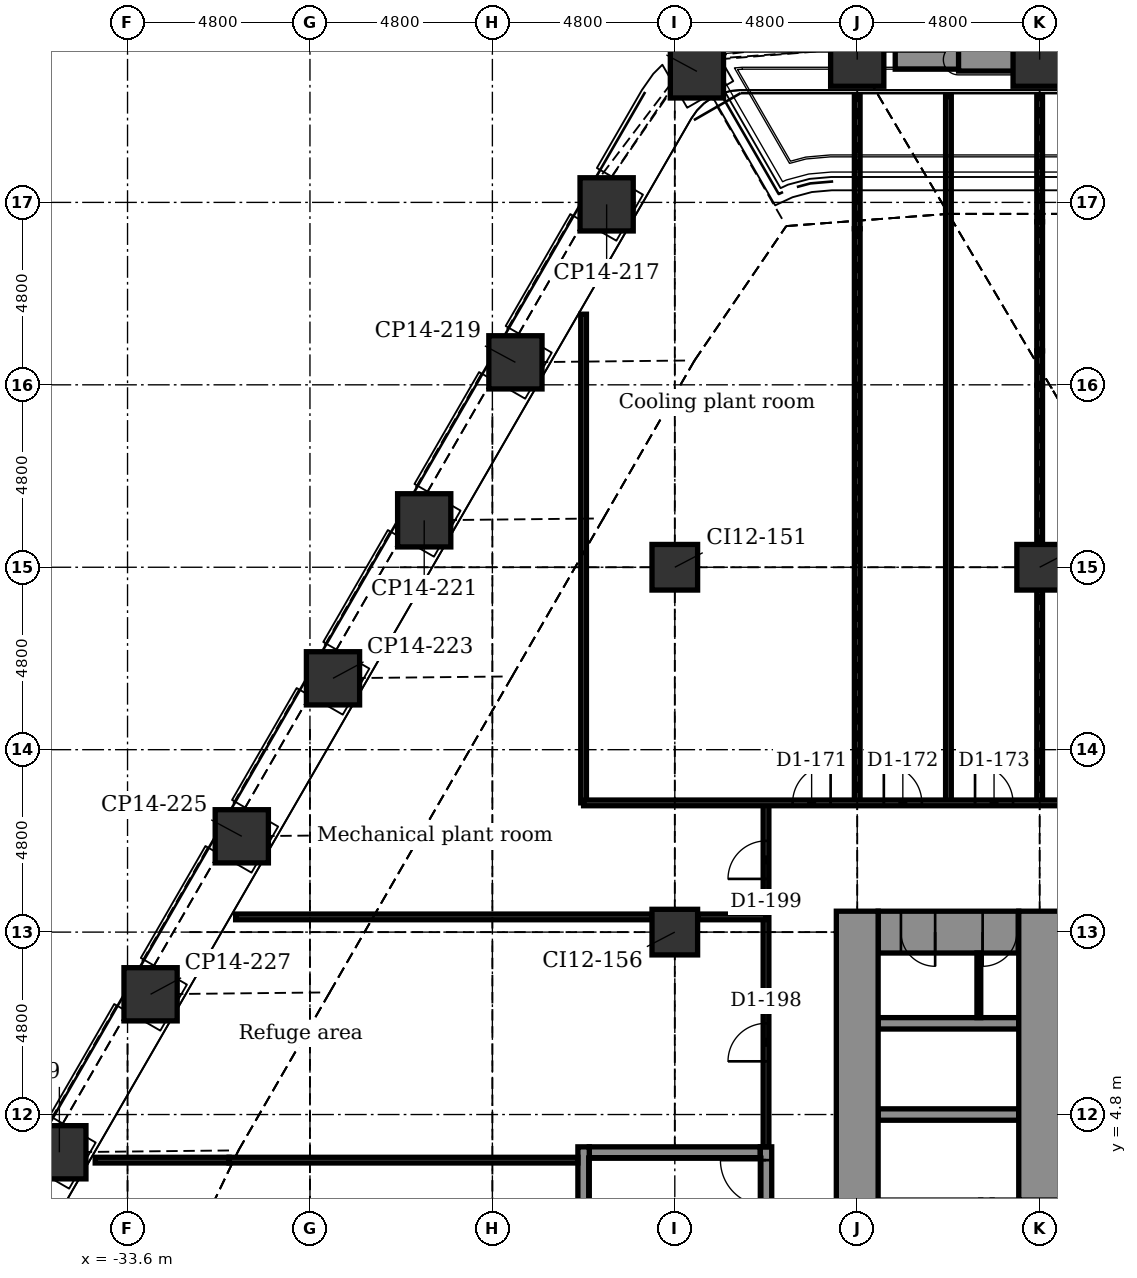
"""IFC4 building model, lengths in metres.
Left out: names, types, materials, properties, quantities, classifications, styles, units other than length and angle.
Written with IfcOpenShell. Run it as: python <this file> out.ifc"""

import sys

from ifc_helpers import new_model, si_unit, direction, frame, frame_2d, origin, origin_2d, place, context, subcontext, project, spatial, rectangle, extrude, element, fill, save


model = new_model("IFC4")
c1 = context("Model", 3, precision=1e-05, world=origin(), true_north=direction((0.0, 1.0)))
c2 = subcontext(c1, "Body", "Model", "MODEL_VIEW")
j1 = project(units=[si_unit("LENGTHUNIT", "METRE"), si_unit("PLANEANGLEUNIT", "RADIAN")], contexts=[c1])
p1 = place(None, origin())
s1 = spatial("IfcSite", under=j1, at=p1, CompositionType="ELEMENT")
p2 = place(p1, origin())
s2 = spatial("IfcBuilding", under=s1, at=p2, CompositionType="ELEMENT")
p3 = place(p2, frame((0.0, 0.0, 71.9)))
s3 = spatial("IfcBuildingStorey", under=s2, at=p3, CompositionType="ELEMENT", Elevation=71.9)
for number, where, z_axis, x_axis in (
    (1, (-18.618, 32.247, -0.3), (0.0, 0.0, 1.0), (0.866, 0.5, 0.0)),
    (2, (-14.4, 32.555, -0.3), (0.0, 0.0, 1.0), (1.0, 0.0, 0.0)),
    (3, (-9.6, 32.555, -0.3), (0.0, 0.0, 1.0), (1.0, 0.0, 0.0)),
    (4, (-35.394, 3.807, -0.3), (0.0, 0.0, 1.0), (0.5, 0.866, 0.0)),
    (5, (-32.994, 7.964, -0.3), (0.0, 0.0, 1.0), (0.5, 0.866, 0.0)),
    (6, (-30.594, 12.121, -0.3), (0.0, 0.0, 1.0), (0.5, 0.866, 0.0)),
    (7, (-28.194, 16.278, -0.3), (0.0, 0.0, 1.0), (0.5, 0.866, 0.0)),
    (8, (-25.794, 20.435, -0.3), (0.0, 0.0, 1.0), (0.5, 0.866, 0.0)),
    (9, (-23.394, 24.592, -0.3), (0.0, 0.0, 1.0), (0.5, 0.866, 0.0)),
    (10, (-20.994, 28.749, -0.3), (0.0, 0.0, 1.0), (0.5, 0.866, 0.0)),
):
    element("IfcColumn", number, at=place(p3, frame(where, z_axis=z_axis, x_axis=x_axis)), inside=s3, PredefinedType="COLUMN", context=c2, shape_type="SweptSolid", body=[
        extrude(rectangle(XDim=1.4, YDim=1.4, at=origin_2d()), origin(), (0.0, 0.0, 1.0), 6.1),
    ])
for number, where, z_axis, x_axis in (
    (11, (-19.2, 9.6, -0.3), (0.0, 0.0, 1.0), (1.0, 0.0, 0.0)),
    (12, (-19.2, 19.2, -0.3), (0.0, 0.0, 1.0), (1.0, 0.0, 0.0)),
    (13, (-9.6, 19.2, -0.3), (0.0, 0.0, 1.0), (1.0, 0.0, 0.0)),
):
    element("IfcColumn", number, at=place(p3, frame(where, z_axis=z_axis, x_axis=x_axis)), inside=s3, PredefinedType="COLUMN", context=c2, shape_type="SweptSolid", body=[
        extrude(rectangle(XDim=1.2, YDim=1.2, at=origin_2d()), origin(), (0.0, 0.0, 1.0), 6.1),
    ])
p4 = place(p3, frame((-21.45, 3.8, -0.3), z_axis=(0.0, 0.0, 1.0), x_axis=(1.0, 0.0, 0.0)))
e14 = element("IfcWall", 14, at=p4, inside=s3, PredefinedType="STANDARD", context=c2, shape_type="SweptSolid", body=[
    extrude(rectangle(XDim=4.5, YDim=0.3, at=frame_2d((2.25, 0.0))), origin(), (0.0, 0.0, 1.0), 6.1),
])
for number, where, z_axis, x_axis in (
    (15, (-13.85, 4.8, -0.3), (0.0, 0.0, 1.0), (1.0, 0.0, 0.0)),
    (16, (-13.85, 7.2, -0.3), (0.0, 0.0, 1.0), (1.0, 0.0, 0.0)),
):
    element("IfcWall", number, at=place(p3, frame(where, z_axis=z_axis, x_axis=x_axis)), inside=s3, PredefinedType="STANDARD", context=c2, shape_type="SweptSolid", body=[
        extrude(rectangle(XDim=3.7, YDim=0.3, at=frame_2d((1.85, 0.0))), origin(), (0.0, 0.0, 1.0), 6.1),
    ])
p5 = place(p3, frame((-13.85, 9.6, -0.3), z_axis=(0.0, 0.0, 1.0), x_axis=(1.0, 0.0, 0.0)))
e17 = element("IfcWall", 17, at=p5, inside=s3, PredefinedType="SHEAR", context=c2, shape_type="SweptSolid", body=[
    extrude(rectangle(XDim=3.7, YDim=1.1, at=frame_2d((1.85, 0.0))), origin(), (0.0, 0.0, 1.0), 6.1),
])
p6 = place(p5, frame((0.6, 0.0, 0.3)))
e18 = element("IfcOpeningElement", 18, at=p6, cuts=e17, PredefinedType="OPENING", context=c2, shape_type="SweptSolid", body=[
    extrude(rectangle(XDim=0.9, YDim=2.1, at=frame_2d((0.45, 1.05))), frame((0.0, 0.56, 0.0), z_axis=(0.0, -1.0, 0.0), x_axis=(1.0, 0.0, 0.0)), (0.0, 0.0, 1.0), 1.12),
])
p7 = place(p5, frame((2.75, 0.0, 0.3)))
e19 = element("IfcOpeningElement", 19, at=p7, cuts=e17, PredefinedType="OPENING", context=c2, shape_type="SweptSolid", body=[
    extrude(rectangle(XDim=0.9, YDim=2.1, at=frame_2d((0.45, 1.05))), frame((0.0, 0.56, 0.0), z_axis=(0.0, -1.0, 0.0), x_axis=(1.0, 0.0, 0.0)), (0.0, 0.0, 1.0), 1.12),
])
p8 = place(p3, frame((-21.6, -3.95, -0.3), z_axis=(0.0, 0.0, 1.0), x_axis=(0.0, 1.0, 0.0)))
e20 = element("IfcWall", 20, at=p8, inside=s3, PredefinedType="STANDARD", context=c2, shape_type="SweptSolid", body=[
    extrude(rectangle(XDim=7.9, YDim=0.3, at=frame_2d((3.95, 0.0))), origin(), (0.0, 0.0, 1.0), 6.1),
])
p9 = place(p3, frame((-16.8, -3.95, -0.3), z_axis=(0.0, 0.0, 1.0), x_axis=(0.0, 1.0, 0.0)))
e21 = element("IfcWall", 21, at=p9, inside=s3, PredefinedType="STANDARD", context=c2, shape_type="SweptSolid", body=[
    extrude(rectangle(XDim=7.9, YDim=0.3, at=frame_2d((3.95, 0.0))), origin(), (0.0, 0.0, 1.0), 6.1),
])
p10 = place(p9, frame((6.35, 0.0, 0.3)))
e22 = element("IfcOpeningElement", 22, at=p10, cuts=e21, PredefinedType="OPENING", context=c2, shape_type="SweptSolid", body=[
    extrude(rectangle(XDim=1.2, YDim=2.1, at=frame_2d((0.6, 1.05))), frame((0.0, 0.16, 0.0), z_axis=(0.0, -1.0, 0.0), x_axis=(1.0, 0.0, 0.0)), (0.0, 0.0, 1.0), 0.32),
])
p11 = place(p3, frame((-14.4, -10.15, -0.3), z_axis=(0.0, 0.0, 1.0), x_axis=(0.0, 1.0, 0.0)))
e23 = element("IfcWall", 23, at=p11, inside=s3, PredefinedType="SHEAR", context=c2, shape_type="SweptSolid", body=[
    extrude(rectangle(XDim=20.3, YDim=1.1, at=frame_2d((10.15, 0.0))), origin(), (0.0, 0.0, 1.0), 6.1),
])
p12 = place(p11, frame((3.6, 0.0, 0.3)))
e24 = element("IfcOpeningElement", 24, at=p12, cuts=e23, PredefinedType="OPENING", context=c2, shape_type="SweptSolid", body=[
    extrude(rectangle(XDim=1.1, YDim=2.1, at=frame_2d((0.55, 1.05))), frame((0.0, 0.56, 0.0), z_axis=(0.0, -1.0, 0.0), x_axis=(1.0, 0.0, 0.0)), (0.0, 0.0, 1.0), 1.12),
])
p13 = place(p11, frame((6.0, 0.0, 0.3)))
e25 = element("IfcOpeningElement", 25, at=p13, cuts=e23, PredefinedType="OPENING", context=c2, shape_type="SweptSolid", body=[
    extrude(rectangle(XDim=1.1, YDim=2.1, at=frame_2d((0.55, 1.05))), frame((0.0, 0.56, 0.0), z_axis=(0.0, -1.0, 0.0), x_axis=(1.0, 0.0, 0.0)), (0.0, 0.0, 1.0), 1.12),
])
p14 = place(p11, frame((8.4, 0.0, 0.3)))
e26 = element("IfcOpeningElement", 26, at=p14, cuts=e23, PredefinedType="OPENING", context=c2, shape_type="SweptSolid", body=[
    extrude(rectangle(XDim=1.1, YDim=2.1, at=frame_2d((0.55, 1.05))), frame((0.0, 0.56, 0.0), z_axis=(0.0, -1.0, 0.0), x_axis=(1.0, 0.0, 0.0)), (0.0, 0.0, 1.0), 1.12),
])
p15 = place(p11, frame((10.8, 0.0, 0.3)))
e27 = element("IfcOpeningElement", 27, at=p15, cuts=e23, PredefinedType="OPENING", context=c2, shape_type="SweptSolid", body=[
    extrude(rectangle(XDim=1.1, YDim=2.1, at=frame_2d((0.55, 1.05))), frame((0.0, 0.56, 0.0), z_axis=(0.0, -1.0, 0.0), x_axis=(1.0, 0.0, 0.0)), (0.0, 0.0, 1.0), 1.12),
])
p16 = place(p3, frame((-9.6, 2.55, -0.3), z_axis=(0.0, 0.0, 1.0), x_axis=(0.0, 1.0, 0.0)))
e28 = element("IfcWall", 28, at=p16, inside=s3, PredefinedType="SHEAR", context=c2, shape_type="SweptSolid", body=[
    extrude(rectangle(XDim=7.6, YDim=1.1, at=frame_2d((3.8, 0.0))), origin(), (0.0, 0.0, 1.0), 6.1),
])
p17 = place(p3, frame((-13.4, 32.605, 0.0), z_axis=(0.0, 0.0, 1.0), x_axis=(1.0, 0.0, 0.0)))
e29 = element("IfcWall", 29, at=p17, inside=s3, PredefinedType="USERDEFINED", context=c2, shape_type="SweptSolid", body=[
    extrude(rectangle(XDim=2.8, YDim=0.6, at=frame_2d((1.4, 0.0))), origin(), (0.0, 0.0, 1.0), 0.7),
])
p18 = place(p3, frame((-11.734, 32.555, 6.0), z_axis=(0.0, 0.0, 1.0), x_axis=(1.0, 0.0, 0.0)))
e30 = element("IfcWall", 30, at=p18, inside=s3, PredefinedType="USERDEFINED", context=c2, shape_type="SweptSolid", body=[
    extrude(rectangle(XDim=6.0, YDim=0.6, at=frame_2d((3.0, 0.0))), origin(), (0.0, 0.0, 1.0), 0.7),
])
p19 = place(p3, frame((-9.6, 13.0, 0.0), z_axis=(0.0, 0.0, 1.0), x_axis=(0.0, 1.0, 0.0)))
e31 = element("IfcWall", 31, at=p19, inside=s3, PredefinedType="PARTITIONING", context=c2, shape_type="SweptSolid", body=[
    extrude(rectangle(XDim=5.6, YDim=0.15, at=frame_2d((2.8, 0.0))), origin(), (0.0, 0.0, 1.0), 5.343),
])
p20 = place(p3, frame((-9.6, 19.8, 0.0), z_axis=(0.0, 0.0, 1.0), x_axis=(0.0, 1.0, 0.0)))
e32 = element("IfcWall", 32, at=p20, inside=s3, PredefinedType="PARTITIONING", context=c2, shape_type="SweptSolid", body=[
    extrude(rectangle(XDim=4.19, YDim=0.15, at=frame_2d((2.095, 0.0))), origin(), (0.0, 0.0, 1.0), 5.49),
])
p21 = place(p3, frame((-9.6, 23.99, 0.0), z_axis=(0.0, 0.0, 1.0), x_axis=(0.0, 1.0, 0.0)))
e33 = element("IfcWall", 33, at=p21, inside=s3, PredefinedType="PARTITIONING", context=c2, shape_type="SweptSolid", body=[
    extrude(rectangle(XDim=0.902, YDim=0.15, at=frame_2d((0.451, 0.0))), origin(), (0.0, 0.0, 1.0), 5.7),
])
p22 = place(p3, frame((-9.6, 24.893, 0.0), z_axis=(0.0, 0.0, 1.0), x_axis=(0.0, 1.0, 0.0)))
e34 = element("IfcWall", 34, at=p22, inside=s3, PredefinedType="PARTITIONING", context=c2, shape_type="SweptSolid", body=[
    extrude(rectangle(XDim=3.396, YDim=0.15, at=frame_2d((1.698, 0.0))), origin(), (0.0, 0.0, 1.0), 5.49),
])
p23 = place(p3, frame((-9.6, 28.289, 0.0), z_axis=(0.0, 0.0, 1.0), x_axis=(0.0, 1.0, 0.0)))
e35 = element("IfcWall", 35, at=p23, inside=s3, PredefinedType="PARTITIONING", context=c2, shape_type="SweptSolid", body=[
    extrude(rectangle(XDim=3.297, YDim=0.15, at=frame_2d((1.648, 0.0))), origin(), (0.0, 0.0, 1.0), 5.7),
])
p24 = place(p3, frame((-11.2, 7.35, 0.0), z_axis=(0.0, 0.0, 1.0), x_axis=(0.0, 1.0, 0.0)))
e36 = element("IfcWall", 36, at=p24, inside=s3, PredefinedType="PARTITIONING", context=c2, shape_type="SweptSolid", body=[
    extrude(rectangle(XDim=1.7, YDim=0.1, at=frame_2d((0.85, 0.0))), origin(), (0.0, 0.0, 1.0), 5.8),
])
p25 = place(p3, frame((-12.0, 13.0, 0.0), z_axis=(0.0, 0.0, 1.0), x_axis=(0.0, 1.0, 0.0)))
e37 = element("IfcWall", 37, at=p25, inside=s3, PredefinedType="PARTITIONING", context=c2, shape_type="SweptSolid", body=[
    extrude(rectangle(XDim=18.585, YDim=0.15, at=frame_2d((9.293, 0.0))), origin(), (0.0, 0.0, 1.0), 5.7),
])
p26 = place(p3, frame((-14.4, 13.0, 0.0), z_axis=(0.0, 0.0, 1.0), x_axis=(0.0, 1.0, 0.0)))
e38 = element("IfcWall", 38, at=p26, inside=s3, PredefinedType="PARTITIONING", context=c2, shape_type="SweptSolid", body=[
    extrude(rectangle(XDim=15.107, YDim=0.15, at=frame_2d((7.553, 0.0))), origin(), (0.0, 0.0, 1.0), 5.343),
])
p27 = place(p3, frame((-14.4, 28.107, 0.0), z_axis=(0.0, 0.0, 1.0), x_axis=(0.0, 1.0, 0.0)))
e39 = element("IfcWall", 39, at=p27, inside=s3, PredefinedType="PARTITIONING", context=c2, shape_type="SweptSolid", body=[
    extrude(rectangle(XDim=3.479, YDim=0.15, at=frame_2d((1.739, 0.0))), origin(), (0.0, 0.0, 1.0), 5.7),
])
p28 = place(p3, frame((-16.8, 3.95, 0.0), z_axis=(0.0, 0.0, 1.0), x_axis=(0.0, 1.0, 0.0)))
e40 = element("IfcWall", 40, at=p28, inside=s3, PredefinedType="PARTITIONING", context=c2, shape_type="SweptSolid", body=[
    extrude(rectangle(XDim=9.05, YDim=0.15, at=frame_2d((4.525, 0.0))), origin(), (0.0, 0.0, 1.0), 5.8),
])
p29 = place(p28, frame((2.25, 0.0, 0.0)))
e41 = element("IfcOpeningElement", 41, at=p29, cuts=e40, PredefinedType="OPENING", context=c2, shape_type="SweptSolid", body=[
    extrude(rectangle(XDim=1.0, YDim=2.1, at=frame_2d((0.5, 1.05))), frame((0.0, 0.085, 0.0), z_axis=(0.0, -1.0, 0.0), x_axis=(1.0, 0.0, 0.0)), (0.0, 0.0, 1.0), 0.17),
])
p30 = place(p28, frame((7.05, 0.0, 0.0)))
e42 = element("IfcOpeningElement", 42, at=p30, cuts=e40, PredefinedType="OPENING", context=c2, shape_type="SweptSolid", body=[
    extrude(rectangle(XDim=1.0, YDim=2.1, at=frame_2d((0.5, 1.05))), frame((0.0, 0.085, 0.0), z_axis=(0.0, -1.0, 0.0), x_axis=(1.0, 0.0, 0.0)), (0.0, 0.0, 1.0), 0.17),
])
p31 = place(p3, frame((-21.6, 13.0, 0.0), z_axis=(0.0, 0.0, 1.0), x_axis=(0.0, 1.0, 0.0)))
e43 = element("IfcWall", 43, at=p31, inside=s3, PredefinedType="PARTITIONING", context=c2, shape_type="SweptSolid", body=[
    extrude(rectangle(XDim=12.858, YDim=0.15, at=frame_2d((6.429, 0.0))), origin(), (0.0, 0.0, 1.0), 5.8),
])
p32 = place(p3, frame((-30.928, 3.6, 0.0), z_axis=(0.0, 0.0, 1.0), x_axis=(1.0, 0.0, 0.0)))
e44 = element("IfcWall", 44, at=p32, inside=s3, PredefinedType="PARTITIONING", context=c2, shape_type="SweptSolid", body=[
    extrude(rectangle(XDim=9.178, YDim=0.15, at=frame_2d((4.589, 0.0))), origin(), (0.0, 0.0, 1.0), 5.8),
])
p33 = place(p3, frame((-34.451, 3.6, 0.0), z_axis=(0.0, 0.0, 1.0), x_axis=(1.0, 0.0, 0.0)))
e45 = element("IfcWall", 45, at=p33, inside=s3, PredefinedType="PARTITIONING", context=c2, shape_type="SweptSolid", body=[
    extrude(rectangle(XDim=3.523, YDim=0.15, at=frame_2d((1.762, 0.0))), origin(), (0.0, 0.0, 1.0), 4.0),
])
p34 = place(p3, frame((-30.756, 10.0, 0.0), z_axis=(0.0, 0.0, 1.0), x_axis=(1.0, 0.0, 0.0)))
e46 = element("IfcWall", 46, at=p34, inside=s3, PredefinedType="PARTITIONING", context=c2, shape_type="SweptSolid", body=[
    extrude(rectangle(XDim=10.956, YDim=0.15, at=frame_2d((5.478, 0.0))), origin(), (0.0, 0.0, 1.0), 5.8),
])
p35 = place(p3, frame((-18.6, 10.0, 0.0), z_axis=(0.0, 0.0, 1.0), x_axis=(1.0, 0.0, 0.0)))
e47 = element("IfcWall", 47, at=p35, inside=s3, PredefinedType="PARTITIONING", context=c2, shape_type="SweptSolid", body=[
    extrude(rectangle(XDim=1.8, YDim=0.15, at=frame_2d((0.9, 0.0))), origin(), (0.0, 0.0, 1.0), 5.8),
])
p36 = place(p3, frame((-21.6, 13.0, 0.0), z_axis=(0.0, 0.0, 1.0), x_axis=(1.0, 0.0, 0.0)))
e48 = element("IfcWall", 48, at=p36, inside=s3, PredefinedType="PARTITIONING", context=c2, shape_type="SweptSolid", body=[
    extrude(rectangle(XDim=43.2, YDim=0.15, at=frame_2d((21.6, 0.0))), origin(), (0.0, 0.0, 1.0), 5.8),
])
p37 = place(p36, frame((5.5, 0.0, 0.0)))
e49 = element("IfcOpeningElement", 49, at=p37, cuts=e48, PredefinedType="OPENING", context=c2, shape_type="SweptSolid", body=[
    extrude(rectangle(XDim=1.0, YDim=2.1, at=frame_2d((0.5, 1.05))), frame((0.0, 0.085, 0.0), z_axis=(0.0, -1.0, 0.0), x_axis=(1.0, 0.0, 0.0)), (0.0, 0.0, 1.0), 0.17),
])
p38 = place(p36, frame((7.9, 0.0, 0.0)))
e50 = element("IfcOpeningElement", 50, at=p38, cuts=e48, PredefinedType="OPENING", context=c2, shape_type="SweptSolid", body=[
    extrude(rectangle(XDim=1.0, YDim=2.1, at=frame_2d((0.5, 1.05))), frame((0.0, 0.085, 0.0), z_axis=(0.0, -1.0, 0.0), x_axis=(1.0, 0.0, 0.0)), (0.0, 0.0, 1.0), 0.17),
])
p39 = place(p36, frame((10.3, 0.0, 0.0)))
e51 = element("IfcOpeningElement", 51, at=p39, cuts=e48, PredefinedType="OPENING", context=c2, shape_type="SweptSolid", body=[
    extrude(rectangle(XDim=1.0, YDim=2.1, at=frame_2d((0.5, 1.05))), frame((0.0, 0.085, 0.0), z_axis=(0.0, -1.0, 0.0), x_axis=(1.0, 0.0, 0.0)), (0.0, 0.0, 1.0), 0.17),
])
p40 = place(p36, frame((13.9, 0.0, 0.0)))
e52 = element("IfcOpeningElement", 52, at=p40, cuts=e48, PredefinedType="OPENING", context=c2, shape_type="SweptSolid", body=[
    extrude(rectangle(XDim=1.0, YDim=2.1, at=frame_2d((0.5, 1.05))), frame((0.0, 0.085, 0.0), z_axis=(0.0, -1.0, 0.0), x_axis=(1.0, 0.0, 0.0)), (0.0, 0.0, 1.0), 0.17),
])
p41 = place(p36, frame((23.5, 0.0, 0.0)))
e53 = element("IfcOpeningElement", 53, at=p41, cuts=e48, PredefinedType="OPENING", context=c2, shape_type="SweptSolid", body=[
    extrude(rectangle(XDim=1.0, YDim=2.1, at=frame_2d((0.5, 1.05))), frame((0.0, 0.085, 0.0), z_axis=(0.0, -1.0, 0.0), x_axis=(1.0, 0.0, 0.0)), (0.0, 0.0, 1.0), 0.17),
])
p42 = place(p36, frame((31.9, 0.0, 0.0)))
e54 = element("IfcOpeningElement", 54, at=p42, cuts=e48, PredefinedType="OPENING", context=c2, shape_type="SweptSolid", body=[
    extrude(rectangle(XDim=1.0, YDim=2.1, at=frame_2d((0.5, 1.05))), frame((0.0, 0.085, 0.0), z_axis=(0.0, -1.0, 0.0), x_axis=(1.0, 0.0, 0.0)), (0.0, 0.0, 1.0), 0.17),
])
p43 = place(p36, frame((34.3, 0.0, 0.0)))
e55 = element("IfcOpeningElement", 55, at=p43, cuts=e48, PredefinedType="OPENING", context=c2, shape_type="SweptSolid", body=[
    extrude(rectangle(XDim=1.0, YDim=2.1, at=frame_2d((0.5, 1.05))), frame((0.0, 0.085, 0.0), z_axis=(0.0, -1.0, 0.0), x_axis=(1.0, 0.0, 0.0)), (0.0, 0.0, 1.0), 0.17),
])
p44 = place(p36, frame((36.7, 0.0, 0.0)))
e56 = element("IfcOpeningElement", 56, at=p44, cuts=e48, PredefinedType="OPENING", context=c2, shape_type="SweptSolid", body=[
    extrude(rectangle(XDim=1.0, YDim=2.1, at=frame_2d((0.5, 1.05))), frame((0.0, 0.085, 0.0), z_axis=(0.0, -1.0, 0.0), x_axis=(1.0, 0.0, 0.0)), (0.0, 0.0, 1.0), 0.17),
])
p45 = place(p37, origin())
e57 = element("IfcDoor", 57, at=p45, inside=s3, OperationType="SINGLE_SWING_RIGHT", PredefinedType="DOOR", context=c2, shape_type="SweptSolid", body=[
    extrude(rectangle(XDim=1.0, YDim=2.1, at=frame_2d((0.5, 1.05))), frame((0.0, 0.025, 0.0), z_axis=(0.0, -1.0, 0.0), x_axis=(1.0, 0.0, 0.0)), (0.0, 0.0, 1.0), 0.05),
])
fill(e49, e57)
p46 = place(p38, origin())
e58 = element("IfcDoor", 58, at=p46, inside=s3, OperationType="SINGLE_SWING_LEFT", PredefinedType="DOOR", context=c2, shape_type="SweptSolid", body=[
    extrude(rectangle(XDim=1.0, YDim=2.1, at=frame_2d((0.5, 1.05))), frame((0.0, 0.025, 0.0), z_axis=(0.0, -1.0, 0.0), x_axis=(1.0, 0.0, 0.0)), (0.0, 0.0, 1.0), 0.05),
])
fill(e50, e58)
p47 = place(p39, origin())
e59 = element("IfcDoor", 59, at=p47, inside=s3, OperationType="SINGLE_SWING_LEFT", PredefinedType="DOOR", context=c2, shape_type="SweptSolid", body=[
    extrude(rectangle(XDim=1.0, YDim=2.1, at=frame_2d((0.5, 1.05))), frame((0.0, 0.025, 0.0), z_axis=(0.0, -1.0, 0.0), x_axis=(1.0, 0.0, 0.0)), (0.0, 0.0, 1.0), 0.05),
])
fill(e51, e59)
p48 = place(p29, origin())
e60 = element("IfcDoor", 60, at=p48, inside=s3, OperationType="SINGLE_SWING_LEFT", PredefinedType="DOOR", context=c2, shape_type="SweptSolid", body=[
    extrude(rectangle(XDim=1.0, YDim=2.1, at=frame_2d((0.5, 1.05))), frame((0.0, 0.025, 0.0), z_axis=(0.0, -1.0, 0.0), x_axis=(1.0, 0.0, 0.0)), (0.0, 0.0, 1.0), 0.05),
])
fill(e41, e60)
p49 = place(p30, origin())
e61 = element("IfcDoor", 61, at=p49, inside=s3, OperationType="SINGLE_SWING_LEFT", PredefinedType="DOOR", context=c2, shape_type="SweptSolid", body=[
    extrude(rectangle(XDim=1.0, YDim=2.1, at=frame_2d((0.5, 1.05))), frame((0.0, 0.025, 0.0), z_axis=(0.0, -1.0, 0.0), x_axis=(1.0, 0.0, 0.0)), (0.0, 0.0, 1.0), 0.05),
])
fill(e42, e61)
p50 = place(p10, origin())
e62 = element("IfcDoor", 62, at=p50, inside=s3, OperationType="SINGLE_SWING_RIGHT", PredefinedType="DOOR", context=c2, shape_type="SweptSolid", body=[
    extrude(rectangle(XDim=1.2, YDim=2.1, at=frame_2d((0.6, 1.05))), frame((0.0, 0.025, 0.0), z_axis=(0.0, -1.0, 0.0), x_axis=(1.0, 0.0, 0.0)), (0.0, 0.0, 1.0), 0.05),
])
fill(e22, e62)
p51 = place(p6, frame((0.9, 0.0, 0.0), z_axis=(0.0, 0.0, 1.0), x_axis=(-1.0, 0.0, 0.0)))
e63 = element("IfcDoor", 63, at=p51, inside=s3, OperationType="SINGLE_SWING_RIGHT", PredefinedType="DOOR", context=c2, shape_type="SweptSolid", body=[
    extrude(rectangle(XDim=0.9, YDim=2.1, at=frame_2d((0.45, 1.05))), frame((0.0, 0.025, 0.0), z_axis=(0.0, -1.0, 0.0), x_axis=(1.0, 0.0, 0.0)), (0.0, 0.0, 1.0), 0.05),
])
fill(e18, e63)
p52 = place(p7, frame((0.9, 0.0, 0.0), z_axis=(0.0, 0.0, 1.0), x_axis=(-1.0, 0.0, 0.0)))
e64 = element("IfcDoor", 64, at=p52, inside=s3, OperationType="SINGLE_SWING_LEFT", PredefinedType="DOOR", context=c2, shape_type="SweptSolid", body=[
    extrude(rectangle(XDim=0.9, YDim=2.1, at=frame_2d((0.45, 1.05))), frame((0.0, 0.025, 0.0), z_axis=(0.0, -1.0, 0.0), x_axis=(1.0, 0.0, 0.0)), (0.0, 0.0, 1.0), 0.05),
])
fill(e19, e64)
save(model, sys.argv[1])
